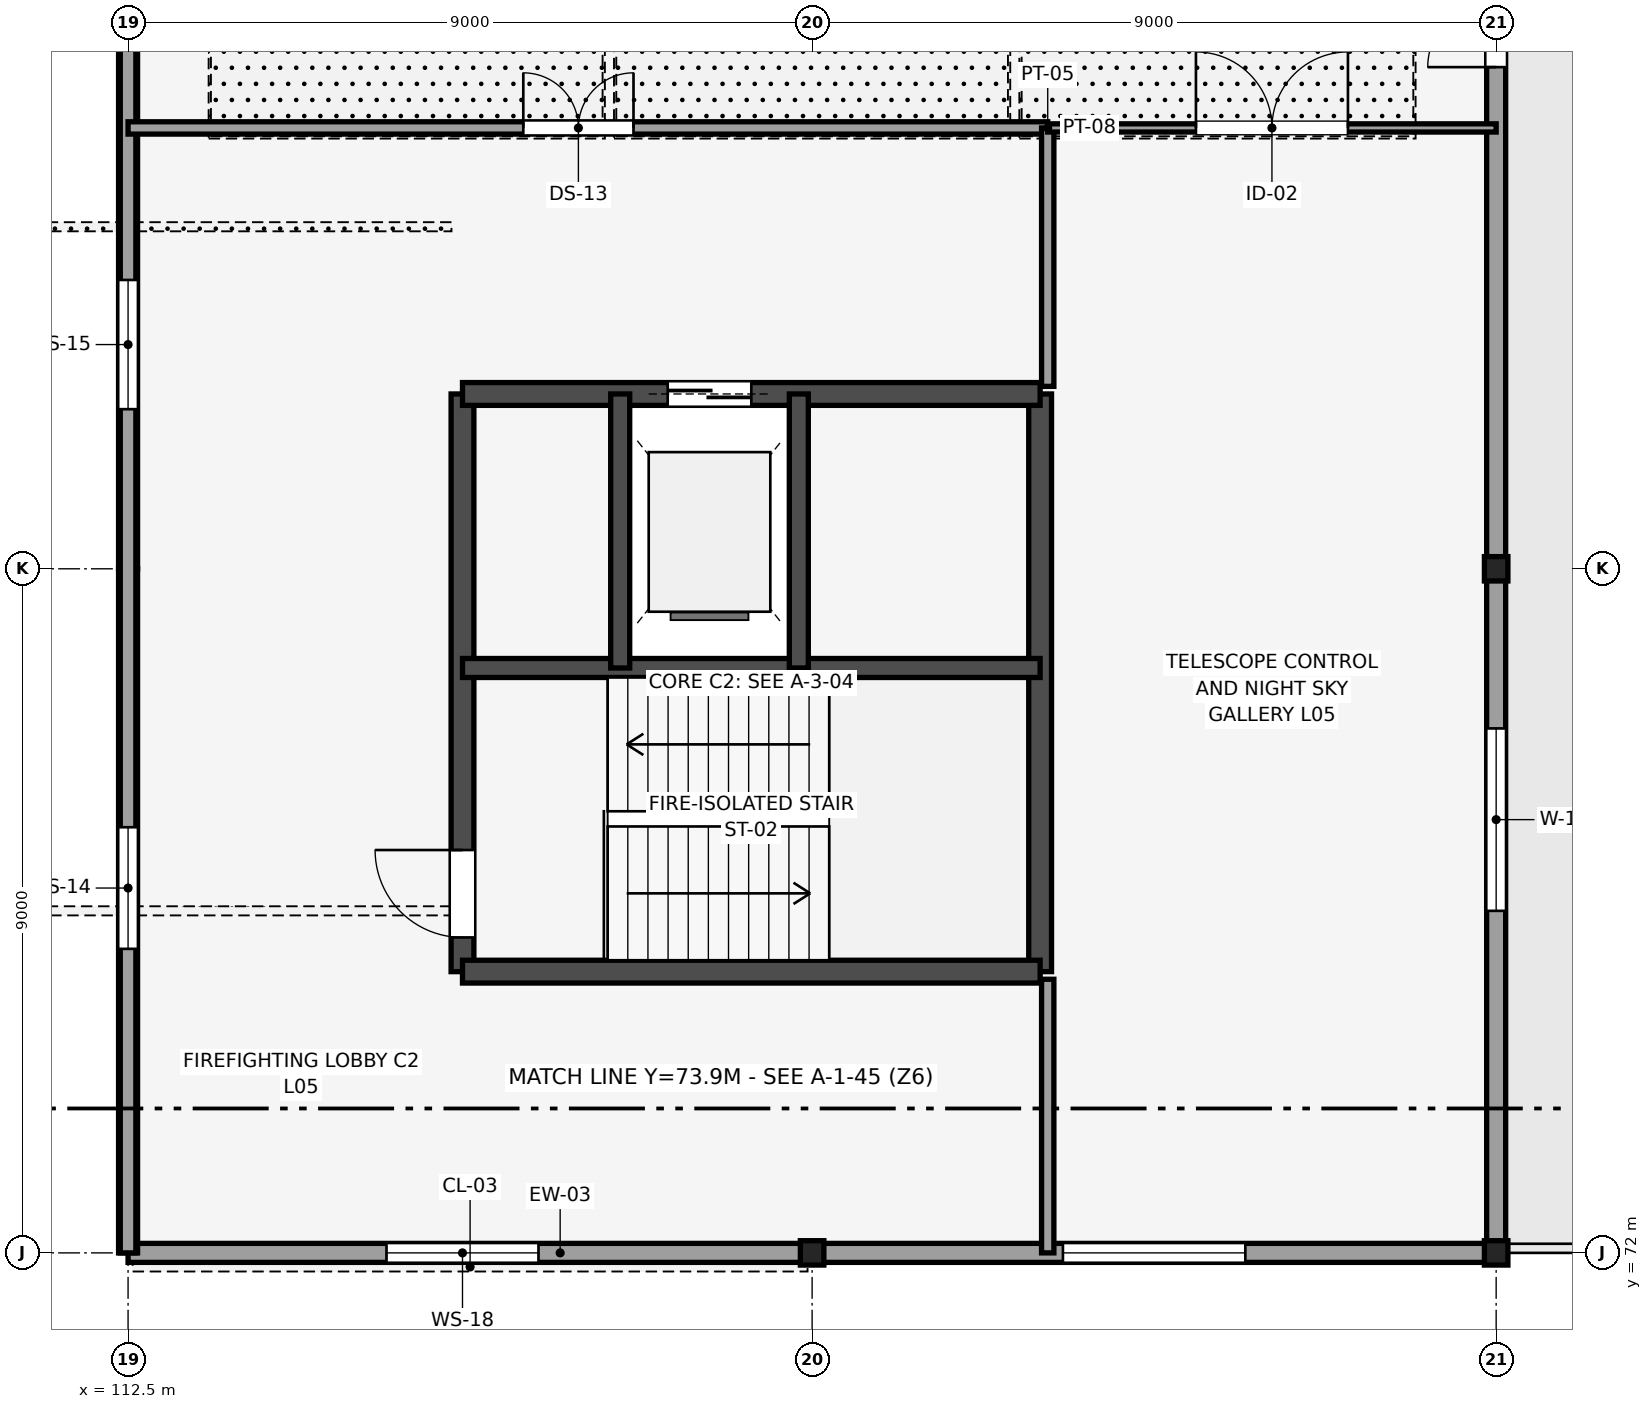
"""IFC4 building model, lengths in metres.
Left out: names, types, materials, properties, quantities, classifications, styles, units other than length and angle.
Written with IfcOpenShell. Run it as: python <this file> out.ifc"""

import sys

from ifc_helpers import new_model, si_unit, direction, frame, frame_2d, origin, origin_2d, place, context, subcontext, project, spatial, rectangle, i_section, extrude, element, fill, save


model = new_model("IFC4")
c1 = context("Model", 3, precision=1e-05, world=origin(), true_north=direction((0.0, 1.0)))
c2 = subcontext(c1, "Body", "Model", "MODEL_VIEW")
j1 = project(units=[si_unit("LENGTHUNIT", "METRE"), si_unit("PLANEANGLEUNIT", "RADIAN")], contexts=[c1])
p1 = place(None, origin())
s1 = spatial("IfcSite", under=j1, at=p1, CompositionType="ELEMENT")
p2 = place(p1, origin())
s2 = spatial("IfcBuilding", under=s1, at=p2, CompositionType="ELEMENT")
p3 = place(p2, frame((0.0, 0.0, 23.4)))
s3 = spatial("IfcBuildingStorey", under=s2, at=p3, CompositionType="ELEMENT", Elevation=23.4)
for number, where, z_axis, x_axis in (
    (1, (121.5, 72.0, 0.0), (0.0, 0.0, 1.0), (1.0, 0.0, 0.0)),
    (2, (130.5, 72.0, 0.0), (0.0, 0.0, 1.0), (1.0, 0.0, 0.0)),
    (3, (130.5, 81.0, 0.0), (0.0, 0.0, 1.0), (1.0, 0.0, 0.0)),
):
    element("IfcColumn", number, at=place(p3, frame(where, z_axis=z_axis, x_axis=x_axis)), inside=s3, PredefinedType="COLUMN", context=c2, shape_type="SweptSolid", body=[
        extrude(i_section(OverallWidth=0.309, OverallDepth=0.321, WebThickness=0.014, FlangeThickness=0.022, FilletRadius=0.017, at=origin_2d()), origin(), (0.0, 0.0, 1.0), 2.55),
    ])
p4 = place(p3, frame((116.9, 75.7, 0.0), z_axis=(0.0, 0.0, 1.0), x_axis=(0.0, 1.0, 0.0)))
e4 = element("IfcWall", 4, at=p4, inside=s3, PredefinedType="SHEAR", context=c2, shape_type="SweptSolid", body=[
    extrude(rectangle(XDim=7.6, YDim=0.3, at=frame_2d((3.8, 0.0))), origin(), (0.0, 0.0, 1.0), 2.39),
])
p5 = place(p4, frame((0.45, 0.0, 0.0)))
e5 = element("IfcOpeningElement", 5, at=p5, cuts=e4, PredefinedType="OPENING", context=c2, shape_type="SweptSolid", body=[
    extrude(rectangle(XDim=1.15, YDim=2.15, at=frame_2d((0.575, 1.075))), frame((0.0, 0.16, 0.0), z_axis=(0.0, -1.0, 0.0), x_axis=(1.0, 0.0, 0.0)), (0.0, 0.0, 1.0), 0.32),
])
for number, where, z_axis, x_axis in (
    (6, (124.5, 75.7, 0.0), (0.0, 0.0, 1.0), (0.0, 1.0, 0.0)),
    (7, (116.9, 75.7, 0.0), (0.0, 0.0, 1.0), (1.0, 0.0, 0.0)),
):
    element("IfcWall", number, at=place(p3, frame(where, z_axis=z_axis, x_axis=x_axis)), inside=s3, PredefinedType="SHEAR", context=c2, shape_type="SweptSolid", body=[
        extrude(rectangle(XDim=7.6, YDim=0.3, at=frame_2d((3.8, 0.0))), origin(), (0.0, 0.0, 1.0), 2.39),
    ])
p6 = place(p3, frame((116.9, 83.3, 0.0), z_axis=(0.0, 0.0, 1.0), x_axis=(1.0, 0.0, 0.0)))
e8 = element("IfcWall", 8, at=p6, inside=s3, PredefinedType="SHEAR", context=c2, shape_type="SweptSolid", body=[
    extrude(rectangle(XDim=7.6, YDim=0.3, at=frame_2d((3.8, 0.0))), origin(), (0.0, 0.0, 1.0), 2.39),
])
p7 = place(p6, frame((2.7, 0.0, 0.0)))
e9 = element("IfcOpeningElement", 9, at=p7, cuts=e8, PredefinedType="OPENING", context=c2, shape_type="SweptSolid", body=[
    extrude(rectangle(XDim=1.1, YDim=2.2, at=frame_2d((0.55, 1.1))), frame((0.0, 0.16, 0.0), z_axis=(0.0, -1.0, 0.0), x_axis=(1.0, 0.0, 0.0)), (0.0, 0.0, 1.0), 0.32),
])
p8 = place(p3, frame((116.9, 79.695, 0.0), z_axis=(0.0, 0.0, 1.0), x_axis=(1.0, 0.0, 0.0)))
e10 = element("IfcWall", 10, at=p8, inside=s3, PredefinedType="SHEAR", context=c2, shape_type="SweptSolid", body=[
    extrude(rectangle(XDim=7.6, YDim=0.25, at=frame_2d((3.8, 0.0))), origin(), (0.0, 0.0, 1.0), 2.39),
])
for number, where, z_axis, x_axis in (
    (11, (118.975, 79.695, 0.0), (0.0, 0.0, 1.0), (0.0, 1.0, 0.0)),
    (12, (121.325, 79.695, 0.0), (0.0, 0.0, 1.0), (0.0, 1.0, 0.0)),
):
    element("IfcWall", number, at=place(p3, frame(where, z_axis=z_axis, x_axis=x_axis)), inside=s3, PredefinedType="SHEAR", context=c2, shape_type="SweptSolid", body=[
        extrude(rectangle(XDim=3.605, YDim=0.25, at=frame_2d((1.802, 0.0))), origin(), (0.0, 0.0, 1.0), 2.39),
    ])
p9 = place(p3, frame((112.5, 72.0, 0.0), z_axis=(0.0, 0.0, 1.0), x_axis=(1.0, 0.0, 0.0)))
e13 = element("IfcWall", 13, at=p9, inside=s3, PredefinedType="STANDARD", context=c2, shape_type="SweptSolid", body=[
    extrude(rectangle(XDim=9.0, YDim=0.25, at=frame_2d((4.5, 0.0))), origin(), (0.0, 0.0, 1.0), 2.39),
])
p10 = place(p9, frame((3.4, 0.0, 0.3)))
e14 = element("IfcOpeningElement", 14, at=p10, cuts=e13, PredefinedType="OPENING", context=c2, shape_type="SweptSolid", body=[
    extrude(rectangle(XDim=2.0, YDim=1.3, at=frame_2d((1.0, 0.65))), frame((0.0, 0.135, 0.0), z_axis=(0.0, -1.0, 0.0), x_axis=(1.0, 0.0, 0.0)), (0.0, 0.0, 1.0), 0.27),
])
p11 = place(p3, frame((121.5, 72.0, 0.0), z_axis=(0.0, 0.0, 1.0), x_axis=(1.0, 0.0, 0.0)))
e15 = element("IfcWall", 15, at=p11, inside=s3, PredefinedType="STANDARD", context=c2, shape_type="SweptSolid", body=[
    extrude(rectangle(XDim=9.0, YDim=0.25, at=frame_2d((4.5, 0.0))), origin(), (0.0, 0.0, 1.0), 2.114),
])
p12 = place(p11, frame((3.3, 0.0, 0.35)))
e16 = element("IfcOpeningElement", 16, at=p12, cuts=e15, PredefinedType="OPENING", context=c2, shape_type="SweptSolid", body=[
    extrude(rectangle(XDim=2.4, YDim=1.5, at=frame_2d((1.2, 0.75))), frame((0.0, 0.135, 0.0), z_axis=(0.0, -1.0, 0.0), x_axis=(1.0, 0.0, 0.0)), (0.0, 0.0, 1.0), 0.27),
])
p13 = place(p3, frame((130.5, 72.0, 0.0), z_axis=(0.0, 0.0, 1.0), x_axis=(0.0, 1.0, 0.0)))
e17 = element("IfcWall", 17, at=p13, inside=s3, PredefinedType="STANDARD", context=c2, shape_type="SweptSolid", body=[
    extrude(rectangle(XDim=18.0, YDim=0.25, at=frame_2d((9.0, 0.0))), origin(), (0.0, 0.0, 1.0), 2.114),
])
p14 = place(p13, frame((4.5, 0.0, 0.25)))
e18 = element("IfcOpeningElement", 18, at=p14, cuts=e17, PredefinedType="OPENING", context=c2, shape_type="SweptSolid", body=[
    extrude(rectangle(XDim=2.4, YDim=1.5, at=frame_2d((1.2, 0.75))), frame((0.0, 0.135, 0.0), z_axis=(0.0, -1.0, 0.0), x_axis=(1.0, 0.0, 0.0)), (0.0, 0.0, 1.0), 0.27),
])
p15 = place(p13, frame((15.6, 0.0, 0.0)))
e19 = element("IfcOpeningElement", 19, at=p15, cuts=e17, PredefinedType="OPENING", context=c2, shape_type="SweptSolid", body=[
    extrude(rectangle(XDim=1.8, YDim=2.05, at=frame_2d((0.9, 1.025))), frame((0.0, 0.135, 0.0), z_axis=(0.0, -1.0, 0.0), x_axis=(1.0, 0.0, 0.0)), (0.0, 0.0, 1.0), 0.27),
])
p16 = place(p3, frame((112.5, 81.0, 0.0), z_axis=(0.0, 0.0, 1.0), x_axis=(0.0, -1.0, 0.0)))
e20 = element("IfcWall", 20, at=p16, inside=s3, PredefinedType="STANDARD", context=c2, shape_type="SweptSolid", body=[
    extrude(rectangle(XDim=9.0, YDim=0.25, at=frame_2d((4.5, 0.0))), origin(), (0.0, 0.0, 1.0), 2.39),
])
p17 = place(p16, frame((3.4, 0.0, 0.3)))
e21 = element("IfcOpeningElement", 21, at=p17, cuts=e20, PredefinedType="OPENING", context=c2, shape_type="SweptSolid", body=[
    extrude(rectangle(XDim=1.6, YDim=1.3, at=frame_2d((0.8, 0.65))), frame((0.0, 0.135, 0.0), z_axis=(0.0, -1.0, 0.0), x_axis=(1.0, 0.0, 0.0)), (0.0, 0.0, 1.0), 0.27),
])
p18 = place(p3, frame((112.5, 90.0, 0.0), z_axis=(0.0, 0.0, 1.0), x_axis=(0.0, -1.0, 0.0)))
e22 = element("IfcWall", 22, at=p18, inside=s3, PredefinedType="STANDARD", context=c2, shape_type="SweptSolid", body=[
    extrude(rectangle(XDim=9.0, YDim=0.25, at=frame_2d((4.5, 0.0))), origin(), (0.0, 0.0, 1.0), 2.39),
])
p19 = place(p18, frame((5.2, 0.0, 0.3)))
e23 = element("IfcOpeningElement", 23, at=p19, cuts=e22, PredefinedType="OPENING", context=c2, shape_type="SweptSolid", body=[
    extrude(rectangle(XDim=1.7, YDim=1.3, at=frame_2d((0.85, 0.65))), frame((0.0, 0.135, 0.0), z_axis=(0.0, -1.0, 0.0), x_axis=(1.0, 0.0, 0.0)), (0.0, 0.0, 1.0), 0.27),
])
p20 = place(p3, frame((112.5, 72.0, 2.55), z_axis=(0.0, 0.0, 1.0), x_axis=(0.0, 1.0, 0.0)))
e24 = element("IfcWall", 24, at=p20, inside=s3, PredefinedType="PARAPET", context=c2, shape_type="SweptSolid", body=[
    extrude(rectangle(XDim=36.0, YDim=0.205, at=frame_2d((18.0, 0.0))), origin(), (0.0, 0.0, 1.0), 0.4),
])
p21 = place(p3, frame((112.5, 86.8, 0.0), z_axis=(0.0, 0.0, 1.0), x_axis=(1.0, 0.0, 0.0)))
e25 = element("IfcWall", 25, at=p21, inside=s3, PredefinedType="PARTITIONING", context=c2, shape_type="SweptSolid", body=[
    extrude(rectangle(XDim=12.1, YDim=0.162, at=frame_2d((6.05, 0.0))), origin(), (0.0, 0.0, 1.0), 2.24),
])
p22 = place(p21, frame((5.2, 0.0, 0.0)))
e26 = element("IfcOpeningElement", 26, at=p22, cuts=e25, PredefinedType="OPENING", context=c2, shape_type="SweptSolid", body=[
    extrude(rectangle(XDim=1.45, YDim=2.2, at=frame_2d((0.725, 1.1))), frame((0.0, 0.091, 0.0), z_axis=(0.0, -1.0, 0.0), x_axis=(1.0, 0.0, 0.0)), (0.0, 0.0, 1.0), 0.182),
])
p23 = place(p3, frame((124.6, 83.4, 0.0), z_axis=(0.0, 0.0, 1.0), x_axis=(0.0, 1.0, 0.0)))
e27 = element("IfcWall", 27, at=p23, inside=s3, PredefinedType="PARTITIONING", context=c2, shape_type="SweptSolid", body=[
    extrude(rectangle(XDim=3.4, YDim=0.162, at=frame_2d((1.7, 0.0))), origin(), (0.0, 0.0, 1.0), 2.24),
])
p24 = place(p3, frame((124.6, 72.0, 0.0), z_axis=(0.0, 0.0, 1.0), x_axis=(0.0, 1.0, 0.0)))
e28 = element("IfcWall", 28, at=p24, inside=s3, PredefinedType="PARTITIONING", context=c2, shape_type="SweptSolid", body=[
    extrude(rectangle(XDim=3.6, YDim=0.162, at=frame_2d((1.8, 0.0))), origin(), (0.0, 0.0, 1.0), 2.24),
])
p25 = place(p3, frame((124.6, 86.8, 0.0), z_axis=(0.0, 0.0, 1.0), x_axis=(1.0, 0.0, 0.0)))
e29 = element("IfcWall", 29, at=p25, inside=s3, PredefinedType="PARTITIONING", context=c2, shape_type="SweptSolid", body=[
    extrude(rectangle(XDim=5.9, YDim=0.108, at=frame_2d((2.95, 0.0))), origin(), (0.0, 0.0, 1.0), 2.24),
])
p26 = place(p25, frame((1.95, 0.0, 0.0)))
e30 = element("IfcOpeningElement", 30, at=p26, cuts=e29, PredefinedType="OPENING", context=c2, shape_type="SweptSolid", body=[
    extrude(rectangle(XDim=2.0, YDim=2.4, at=frame_2d((1.0, 1.2))), frame((0.0, 0.064, 0.0), z_axis=(0.0, -1.0, 0.0), x_axis=(1.0, 0.0, 0.0)), (0.0, 0.0, 1.0), 0.128),
])
p27 = place(p12, origin())
e31 = element("IfcWindow", 31, at=p27, inside=s3, PartitioningType="SINGLE_PANEL", PredefinedType="WINDOW", context=c2, shape_type="SweptSolid", body=[
    extrude(rectangle(XDim=2.4, YDim=1.5, at=frame_2d((1.2, 0.75))), frame((0.0, 0.03, 0.0), z_axis=(0.0, -1.0, 0.0), x_axis=(1.0, 0.0, 0.0)), (0.0, 0.0, 1.0), 0.06),
])
fill(e16, e31)
p28 = place(p14, origin())
e32 = element("IfcWindow", 32, at=p28, inside=s3, PartitioningType="SINGLE_PANEL", PredefinedType="WINDOW", context=c2, shape_type="SweptSolid", body=[
    extrude(rectangle(XDim=2.4, YDim=1.5, at=frame_2d((1.2, 0.75))), frame((0.0, 0.03, 0.0), z_axis=(0.0, -1.0, 0.0), x_axis=(1.0, 0.0, 0.0)), (0.0, 0.0, 1.0), 0.06),
])
fill(e18, e32)
p29 = place(p15, origin())
e33 = element("IfcDoor", 33, at=p29, inside=s3, OperationType="DOUBLE_DOOR_SINGLE_SWING", PredefinedType="DOOR", context=c2, shape_type="SweptSolid", body=[
    extrude(rectangle(XDim=1.8, YDim=2.05, at=frame_2d((0.9, 1.025))), frame((0.0, 0.025, 0.0), z_axis=(0.0, -1.0, 0.0), x_axis=(1.0, 0.0, 0.0)), (0.0, 0.0, 1.0), 0.05),
])
fill(e19, e33)
p30 = place(p17, origin())
e34 = element("IfcWindow", 34, at=p30, inside=s3, PartitioningType="SINGLE_PANEL", PredefinedType="WINDOW", context=c2, shape_type="SweptSolid", body=[
    extrude(rectangle(XDim=1.6, YDim=1.3, at=frame_2d((0.8, 0.65))), frame((0.0, 0.03, 0.0), z_axis=(0.0, -1.0, 0.0), x_axis=(1.0, 0.0, 0.0)), (0.0, 0.0, 1.0), 0.06),
])
fill(e21, e34)
p31 = place(p19, origin())
e35 = element("IfcWindow", 35, at=p31, inside=s3, PartitioningType="SINGLE_PANEL", PredefinedType="WINDOW", context=c2, shape_type="SweptSolid", body=[
    extrude(rectangle(XDim=1.7, YDim=1.3, at=frame_2d((0.85, 0.65))), frame((0.0, 0.03, 0.0), z_axis=(0.0, -1.0, 0.0), x_axis=(1.0, 0.0, 0.0)), (0.0, 0.0, 1.0), 0.06),
])
fill(e23, e35)
p32 = place(p10, origin())
e36 = element("IfcWindow", 36, at=p32, inside=s3, PartitioningType="SINGLE_PANEL", PredefinedType="WINDOW", context=c2, shape_type="SweptSolid", body=[
    extrude(rectangle(XDim=2.0, YDim=1.3, at=frame_2d((1.0, 0.65))), frame((0.0, 0.03, 0.0), z_axis=(0.0, -1.0, 0.0), x_axis=(1.0, 0.0, 0.0)), (0.0, 0.0, 1.0), 0.06),
])
fill(e14, e36)
p33 = place(p5, origin())
e37 = element("IfcDoor", 37, at=p33, inside=s3, OperationType="SINGLE_SWING_RIGHT", PredefinedType="DOOR", context=c2, shape_type="SweptSolid", body=[
    extrude(rectangle(XDim=1.15, YDim=2.15, at=frame_2d((0.575, 1.075))), frame((0.0, 0.025, 0.0), z_axis=(0.0, -1.0, 0.0), x_axis=(1.0, 0.0, 0.0)), (0.0, 0.0, 1.0), 0.05),
])
fill(e5, e37)
p34 = place(p7, origin())
e38 = element("IfcDoor", 38, at=p34, inside=s3, OperationType="DOUBLE_DOOR_SLIDING", PredefinedType="DOOR", context=c2, shape_type="SweptSolid", body=[
    extrude(rectangle(XDim=1.1, YDim=2.2, at=frame_2d((0.55, 1.1))), frame((0.0, 0.025, 0.0), z_axis=(0.0, -1.0, 0.0), x_axis=(1.0, 0.0, 0.0)), (0.0, 0.0, 1.0), 0.05),
])
fill(e9, e38)
p35 = place(p22, origin())
e39 = element("IfcDoor", 39, at=p35, inside=s3, OperationType="DOUBLE_DOOR_SINGLE_SWING", PredefinedType="DOOR", context=c2, shape_type="SweptSolid", body=[
    extrude(rectangle(XDim=1.45, YDim=2.2, at=frame_2d((0.725, 1.1))), frame((0.0, 0.025, 0.0), z_axis=(0.0, -1.0, 0.0), x_axis=(1.0, 0.0, 0.0)), (0.0, 0.0, 1.0), 0.05),
])
fill(e26, e39)
p36 = place(p26, origin())
e40 = element("IfcDoor", 40, at=p36, inside=s3, OperationType="DOUBLE_DOOR_DOUBLE_SWING", PredefinedType="DOOR", context=c2, shape_type="SweptSolid", body=[
    extrude(rectangle(XDim=2.0, YDim=2.4, at=frame_2d((1.0, 1.2))), frame((0.0, 0.025, 0.0), z_axis=(0.0, -1.0, 0.0), x_axis=(1.0, 0.0, 0.0)), (0.0, 0.0, 1.0), 0.05),
])
fill(e30, e40)
save(model, sys.argv[1])
